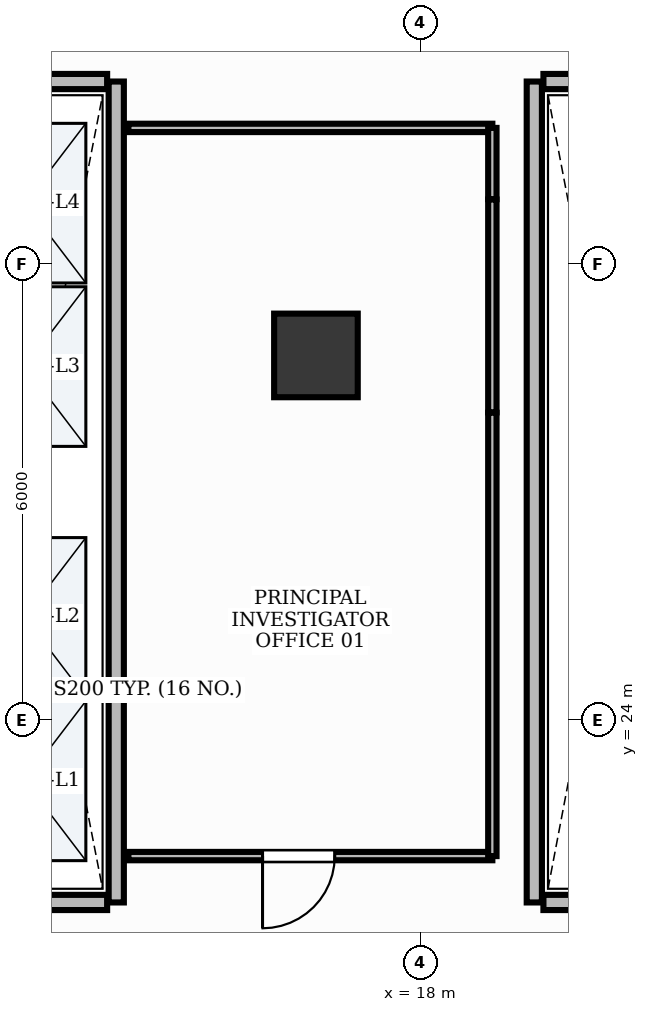
"""IFC4 building model, lengths in metres.
Left out: names, types, materials, properties, quantities, classifications, styles, units other than length and angle.
Written with IfcOpenShell. Run it as: python <this file> out.ifc"""

import sys

from ifc_helpers import new_model, si_unit, direction, frame, frame_2d, origin, origin_2d, place, context, subcontext, project, spatial, rectangle, extrude, element, fill, save


model = new_model("IFC4")
c1 = context("Model", 3, precision=1e-05, world=origin(), true_north=direction((0.0, 1.0)))
c2 = subcontext(c1, "Body", "Model", "MODEL_VIEW")
j1 = project(units=[si_unit("LENGTHUNIT", "METRE"), si_unit("PLANEANGLEUNIT", "RADIAN")], contexts=[c1])
p1 = place(None, origin())
s1 = spatial("IfcSite", under=j1, at=p1, CompositionType="ELEMENT")
p2 = place(p1, origin())
s2 = spatial("IfcBuilding", under=s1, at=p2, CompositionType="ELEMENT")
p3 = place(p2, frame((0.0, 0.0, 144.6)))
s3 = spatial("IfcBuildingStorey", under=s2, at=p3, CompositionType="ELEMENT", Elevation=144.6)
p4 = place(p3, frame((16.627, 28.797, -0.0), z_axis=(0.0, 0.0, 1.0), x_axis=(1.0, 0.0, 0.0)))
e1 = element("IfcColumn", 1, at=p4, inside=s3, PredefinedType="COLUMN", context=c2, shape_type="SweptSolid", body=[
    extrude(rectangle(XDim=1.1, YDim=1.1, at=origin_2d()), origin(), (0.0, 0.0, 1.0), 3.881),
])
p5 = place(p3, frame((14.0, 21.6, 0.0), z_axis=(0.0, 0.0, 1.0), x_axis=(0.0, 1.0, 0.0)))
e2 = element("IfcWall", 2, at=p5, inside=s3, PredefinedType="PARTITIONING", context=c2, shape_type="SweptSolid", body=[
    extrude(rectangle(XDim=10.8, YDim=0.2, at=frame_2d((5.4, 0.0))), origin(), (0.0, 0.0, 1.0), 2.22),
])
for number, where, z_axis, x_axis in (
    (3, (11.72, 21.6, 0.0), (0.0, 0.0, 1.0), (1.0, 0.0, 0.0)),
    (4, (11.72, 32.4, 0.0), (0.0, 0.0, 1.0), (1.0, 0.0, 0.0)),
):
    element("IfcWall", number, at=place(p3, frame(where, z_axis=z_axis, x_axis=x_axis)), inside=s3, PredefinedType="PARTITIONING", context=c2, shape_type="SweptSolid", body=[
        extrude(rectangle(XDim=2.16, YDim=0.2, at=frame_2d((1.08, 0.0))), origin(), (0.0, 0.0, 1.0), 2.22),
    ])
p6 = place(p3, frame((19.5, 21.6, 0.0), z_axis=(0.0, 0.0, 1.0), x_axis=(0.0, 1.0, 0.0)))
e5 = element("IfcWall", 5, at=p6, inside=s3, PredefinedType="PARTITIONING", context=c2, shape_type="SweptSolid", body=[
    extrude(rectangle(XDim=10.8, YDim=0.2, at=frame_2d((5.4, 0.0))), origin(), (0.0, 0.0, 1.0), 2.22),
])
for number, where, z_axis, x_axis in (
    (6, (19.62, 21.6, 0.0), (0.0, 0.0, 1.0), (1.0, 0.0, 0.0)),
    (7, (19.62, 32.4, 0.0), (0.0, 0.0, 1.0), (1.0, 0.0, 0.0)),
):
    element("IfcWall", number, at=place(p3, frame(where, z_axis=z_axis, x_axis=x_axis)), inside=s3, PredefinedType="PARTITIONING", context=c2, shape_type="SweptSolid", body=[
        extrude(rectangle(XDim=2.11, YDim=0.2, at=frame_2d((1.055, 0.0))), origin(), (0.0, 0.0, 1.0), 2.22),
    ])
p7 = place(p3, frame((18.948, 22.21, 0.0), z_axis=(0.0, 0.0, 1.0), x_axis=(-1.0, 0.0, 0.0)))
e8 = element("IfcWall", 8, at=p7, inside=s3, PredefinedType="MOVABLE", context=c2, shape_type="SweptSolid", body=[
    extrude(rectangle(XDim=4.788, YDim=0.11, at=frame_2d((2.394, 0.0))), origin(), (0.0, 0.0, 1.0), 2.22),
])
p8 = place(p7, frame((2.073, 0.0, 0.0)))
e9 = element("IfcOpeningElement", 9, at=p8, cuts=e8, PredefinedType="OPENING", context=c2, shape_type="SweptSolid", body=[
    extrude(rectangle(XDim=0.95, YDim=2.15, at=frame_2d((0.475, 1.075))), frame((0.0, 0.07, 0.0), z_axis=(0.0, -1.0, 0.0), x_axis=(1.0, 0.0, 0.0)), (0.0, 0.0, 1.0), 0.14),
])
p9 = place(p3, frame((14.16, 31.79, 0.0), z_axis=(0.0, 0.0, 1.0), x_axis=(1.0, 0.0, 0.0)))
e10 = element("IfcWall", 10, at=p9, inside=s3, PredefinedType="MOVABLE", context=c2, shape_type="SweptSolid", body=[
    extrude(rectangle(XDim=4.788, YDim=0.11, at=frame_2d((2.394, 0.0))), origin(), (0.0, 0.0, 1.0), 2.22),
])
p10 = place(p3, frame((18.948, 31.79, 0.0), z_axis=(0.0, 0.0, 1.0), x_axis=(0.0, -1.0, 0.0)))
e11 = element("IfcWall", 11, at=p10, inside=s3, PredefinedType="MOVABLE", context=c2, shape_type="SweptSolid", body=[
    extrude(rectangle(XDim=0.938, YDim=0.11, at=frame_2d((0.469, 0.0))), origin(), (0.0, 0.0, 1.0), 2.22),
])
p11 = place(p3, frame((18.948, 30.848, 0.0), z_axis=(0.0, 0.0, 1.0), x_axis=(0.0, -1.0, 0.0)))
e12 = element("IfcWall", 12, at=p11, inside=s3, PredefinedType="MOVABLE", context=c2, shape_type="SweptSolid", body=[
    extrude(rectangle(XDim=2.801, YDim=0.11, at=frame_2d((1.4, 0.0))), origin(), (0.0, 0.0, 1.0), 2.22),
])
p12 = place(p3, frame((18.948, 28.043, 0.0), z_axis=(0.0, 0.0, 1.0), x_axis=(0.0, -1.0, 0.0)))
e13 = element("IfcWall", 13, at=p12, inside=s3, PredefinedType="MOVABLE", context=c2, shape_type="SweptSolid", body=[
    extrude(rectangle(XDim=5.833, YDim=0.11, at=frame_2d((2.917, 0.0))), origin(), (0.0, 0.0, 1.0), 2.22),
])
p13 = place(p8, origin())
e14 = element("IfcDoor", 14, at=p13, inside=s3, OperationType="SINGLE_SWING_RIGHT", PredefinedType="DOOR", context=c2, shape_type="SweptSolid", body=[
    extrude(rectangle(XDim=0.95, YDim=2.15, at=frame_2d((0.475, 1.075))), frame((0.0, 0.025, 0.0), z_axis=(0.0, -1.0, 0.0), x_axis=(1.0, 0.0, 0.0)), (0.0, 0.0, 1.0), 0.05),
])
fill(e9, e14)
save(model, sys.argv[1])
